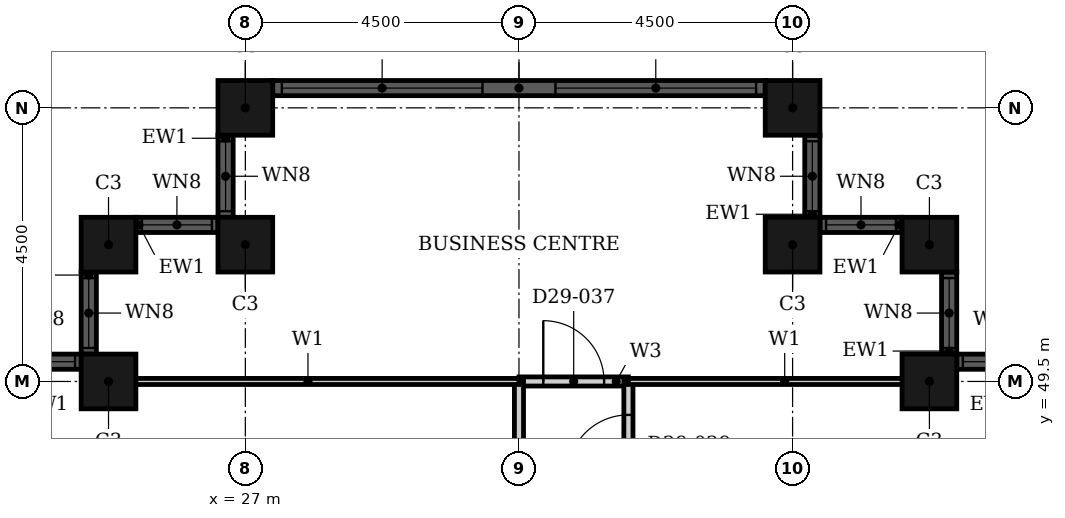
"""IFC4 building model, lengths in metres.
Left out: names, types, materials, properties, quantities, classifications, styles, units other than length and angle.
Written with IfcOpenShell. Run it as: python <this file> out.ifc"""

import sys

from ifc_helpers import new_model, si_unit, direction, frame, frame_2d, origin, origin_2d, place, context, subcontext, project, spatial, rectangle, hollow_rectangle, extrude, element, fill, save


model = new_model("IFC4")
c1 = context("Model", 3, precision=1e-05, world=origin(), true_north=direction((0.0, 1.0)))
c2 = subcontext(c1, "Body", "Model", "MODEL_VIEW")
j1 = project(units=[si_unit("LENGTHUNIT", "METRE"), si_unit("PLANEANGLEUNIT", "RADIAN")], contexts=[c1])
p1 = place(None, origin())
s1 = spatial("IfcSite", under=j1, at=p1, CompositionType="ELEMENT")
p2 = place(p1, origin())
s2 = spatial("IfcBuilding", under=s1, at=p2, CompositionType="ELEMENT")
p3 = place(p2, frame((0.0, 0.0, 118.8)))
s3 = spatial("IfcBuildingStorey", under=s2, at=p3, CompositionType="ELEMENT", Elevation=118.8)
for number, where, z_axis, x_axis in (
    (1, (38.25, 49.5, 0.0), (0.0, 0.0, 1.0), (1.0, 0.0, 0.0)),
    (2, (38.25, 51.75, 0.0), (0.0, 0.0, 1.0), (1.0, 0.0, 0.0)),
    (3, (36.0, 51.75, 0.0), (0.0, 0.0, 1.0), (1.0, 0.0, 0.0)),
    (4, (36.0, 54.0, 0.0), (0.0, 0.0, 1.0), (1.0, 0.0, 0.0)),
    (5, (27.0, 54.0, 0.0), (0.0, 0.0, 1.0), (1.0, 0.0, 0.0)),
    (6, (27.0, 51.75, 0.0), (0.0, 0.0, 1.0), (1.0, 0.0, 0.0)),
    (7, (24.75, 51.75, 0.0), (0.0, 0.0, 1.0), (1.0, 0.0, 0.0)),
    (8, (24.75, 49.5, 0.0), (0.0, 0.0, 1.0), (1.0, 0.0, 0.0)),
):
    element("IfcColumn", number, at=place(p3, frame(where, z_axis=z_axis, x_axis=x_axis)), inside=s3, PredefinedType="COLUMN", context=c2, shape_type="SweptSolid", body=[
        extrude(hollow_rectangle(XDim=0.9, YDim=0.9, WallThickness=0.028, at=origin_2d()), origin(), (0.0, 0.0, 1.0), 3.6),
    ])
p4 = place(p3, frame((40.05, 49.825, 0.0), z_axis=(0.0, 0.0, 1.0), x_axis=(-1.0, 0.0, 0.0)))
e9 = element("IfcWall", 9, at=p4, inside=s3, PredefinedType="SOLIDWALL", context=c2, shape_type="SweptSolid", body=[
    extrude(rectangle(XDim=1.35, YDim=0.25, at=frame_2d((0.675, 0.0))), origin(), (0.0, 0.0, 1.0), 3.6),
])
p5 = place(p4, frame((0.1, 0.0, 0.9)))
e10 = element("IfcOpeningElement", 10, at=p5, cuts=e9, PredefinedType="OPENING", context=c2, shape_type="SweptSolid", body=[
    extrude(rectangle(XDim=1.15, YDim=2.08, at=frame_2d((0.575, 1.04))), frame((0.0, 0.135, 0.0), z_axis=(0.0, -1.0, 0.0), x_axis=(1.0, 0.0, 0.0)), (0.0, 0.0, 1.0), 0.27),
])
p6 = place(p3, frame((38.575, 49.95, 0.0), z_axis=(0.0, 0.0, 1.0), x_axis=(0.0, 1.0, 0.0)))
e11 = element("IfcWall", 11, at=p6, inside=s3, PredefinedType="SOLIDWALL", context=c2, shape_type="SweptSolid", body=[
    extrude(rectangle(XDim=1.35, YDim=0.25, at=frame_2d((0.675, 0.0))), origin(), (0.0, 0.0, 1.0), 3.6),
])
p7 = place(p6, frame((0.1, 0.0, 0.9)))
e12 = element("IfcOpeningElement", 12, at=p7, cuts=e11, PredefinedType="OPENING", context=c2, shape_type="SweptSolid", body=[
    extrude(rectangle(XDim=1.15, YDim=2.08, at=frame_2d((0.575, 1.04))), frame((0.0, 0.135, 0.0), z_axis=(0.0, -1.0, 0.0), x_axis=(1.0, 0.0, 0.0)), (0.0, 0.0, 1.0), 0.27),
])
p8 = place(p3, frame((37.8, 52.075, 0.0), z_axis=(0.0, 0.0, 1.0), x_axis=(-1.0, 0.0, 0.0)))
e13 = element("IfcWall", 13, at=p8, inside=s3, PredefinedType="SOLIDWALL", context=c2, shape_type="SweptSolid", body=[
    extrude(rectangle(XDim=1.35, YDim=0.25, at=frame_2d((0.675, 0.0))), origin(), (0.0, 0.0, 1.0), 3.6),
])
p9 = place(p8, frame((0.1, 0.0, 0.9)))
e14 = element("IfcOpeningElement", 14, at=p9, cuts=e13, PredefinedType="OPENING", context=c2, shape_type="SweptSolid", body=[
    extrude(rectangle(XDim=1.15, YDim=2.08, at=frame_2d((0.575, 1.04))), frame((0.0, 0.135, 0.0), z_axis=(0.0, -1.0, 0.0), x_axis=(1.0, 0.0, 0.0)), (0.0, 0.0, 1.0), 0.27),
])
p10 = place(p3, frame((36.325, 52.2, 0.0), z_axis=(0.0, 0.0, 1.0), x_axis=(0.0, 1.0, 0.0)))
e15 = element("IfcWall", 15, at=p10, inside=s3, PredefinedType="SOLIDWALL", context=c2, shape_type="SweptSolid", body=[
    extrude(rectangle(XDim=1.35, YDim=0.25, at=frame_2d((0.675, 0.0))), origin(), (0.0, 0.0, 1.0), 3.6),
])
p11 = place(p10, frame((0.1, 0.0, 0.9)))
e16 = element("IfcOpeningElement", 16, at=p11, cuts=e15, PredefinedType="OPENING", context=c2, shape_type="SweptSolid", body=[
    extrude(rectangle(XDim=1.15, YDim=2.08, at=frame_2d((0.575, 1.04))), frame((0.0, 0.135, 0.0), z_axis=(0.0, -1.0, 0.0), x_axis=(1.0, 0.0, 0.0)), (0.0, 0.0, 1.0), 0.27),
])
p12 = place(p3, frame((35.55, 54.325, 0.0), z_axis=(0.0, 0.0, 1.0), x_axis=(-1.0, 0.0, 0.0)))
e17 = element("IfcWall", 17, at=p12, inside=s3, PredefinedType="SOLIDWALL", context=c2, shape_type="SweptSolid", body=[
    extrude(rectangle(XDim=8.1, YDim=0.25, at=frame_2d((4.05, 0.0))), origin(), (0.0, 0.0, 1.0), 3.6),
])
p13 = place(p12, frame((0.15, 0.0, 0.9)))
e18 = element("IfcOpeningElement", 18, at=p13, cuts=e17, PredefinedType="OPENING", context=c2, shape_type="SweptSolid", body=[
    extrude(rectangle(XDim=3.3, YDim=2.08, at=frame_2d((1.65, 1.04))), frame((0.0, 0.135, 0.0), z_axis=(0.0, -1.0, 0.0), x_axis=(1.0, 0.0, 0.0)), (0.0, 0.0, 1.0), 0.27),
])
p14 = place(p12, frame((4.65, 0.0, 0.9)))
e19 = element("IfcOpeningElement", 19, at=p14, cuts=e17, PredefinedType="OPENING", context=c2, shape_type="SweptSolid", body=[
    extrude(rectangle(XDim=3.3, YDim=2.08, at=frame_2d((1.65, 1.04))), frame((0.0, 0.135, 0.0), z_axis=(0.0, -1.0, 0.0), x_axis=(1.0, 0.0, 0.0)), (0.0, 0.0, 1.0), 0.27),
])
p15 = place(p3, frame((26.675, 53.55, 0.0), z_axis=(0.0, 0.0, 1.0), x_axis=(0.0, -1.0, 0.0)))
e20 = element("IfcWall", 20, at=p15, inside=s3, PredefinedType="SOLIDWALL", context=c2, shape_type="SweptSolid", body=[
    extrude(rectangle(XDim=1.35, YDim=0.25, at=frame_2d((0.675, 0.0))), origin(), (0.0, 0.0, 1.0), 3.6),
])
p16 = place(p15, frame((0.1, 0.0, 0.9)))
e21 = element("IfcOpeningElement", 21, at=p16, cuts=e20, PredefinedType="OPENING", context=c2, shape_type="SweptSolid", body=[
    extrude(rectangle(XDim=1.15, YDim=2.08, at=frame_2d((0.575, 1.04))), frame((0.0, 0.135, 0.0), z_axis=(0.0, -1.0, 0.0), x_axis=(1.0, 0.0, 0.0)), (0.0, 0.0, 1.0), 0.27),
])
p17 = place(p3, frame((26.55, 52.075, 0.0), z_axis=(0.0, 0.0, 1.0), x_axis=(-1.0, 0.0, 0.0)))
e22 = element("IfcWall", 22, at=p17, inside=s3, PredefinedType="SOLIDWALL", context=c2, shape_type="SweptSolid", body=[
    extrude(rectangle(XDim=1.35, YDim=0.25, at=frame_2d((0.675, 0.0))), origin(), (0.0, 0.0, 1.0), 3.6),
])
p18 = place(p17, frame((0.1, 0.0, 0.9)))
e23 = element("IfcOpeningElement", 23, at=p18, cuts=e22, PredefinedType="OPENING", context=c2, shape_type="SweptSolid", body=[
    extrude(rectangle(XDim=1.15, YDim=2.08, at=frame_2d((0.575, 1.04))), frame((0.0, 0.135, 0.0), z_axis=(0.0, -1.0, 0.0), x_axis=(1.0, 0.0, 0.0)), (0.0, 0.0, 1.0), 0.27),
])
p19 = place(p3, frame((24.425, 51.3, 0.0), z_axis=(0.0, 0.0, 1.0), x_axis=(0.0, -1.0, 0.0)))
e24 = element("IfcWall", 24, at=p19, inside=s3, PredefinedType="SOLIDWALL", context=c2, shape_type="SweptSolid", body=[
    extrude(rectangle(XDim=1.35, YDim=0.25, at=frame_2d((0.675, 0.0))), origin(), (0.0, 0.0, 1.0), 3.6),
])
p20 = place(p19, frame((0.1, 0.0, 0.9)))
e25 = element("IfcOpeningElement", 25, at=p20, cuts=e24, PredefinedType="OPENING", context=c2, shape_type="SweptSolid", body=[
    extrude(rectangle(XDim=1.15, YDim=2.08, at=frame_2d((0.575, 1.04))), frame((0.0, 0.135, 0.0), z_axis=(0.0, -1.0, 0.0), x_axis=(1.0, 0.0, 0.0)), (0.0, 0.0, 1.0), 0.27),
])
p21 = place(p3, frame((24.3, 49.825, 0.0), z_axis=(0.0, 0.0, 1.0), x_axis=(-1.0, 0.0, 0.0)))
e26 = element("IfcWall", 26, at=p21, inside=s3, PredefinedType="SOLIDWALL", context=c2, shape_type="SweptSolid", body=[
    extrude(rectangle(XDim=1.35, YDim=0.25, at=frame_2d((0.675, 0.0))), origin(), (0.0, 0.0, 1.0), 3.6),
])
p22 = place(p21, frame((0.1, 0.0, 0.9)))
e27 = element("IfcOpeningElement", 27, at=p22, cuts=e26, PredefinedType="OPENING", context=c2, shape_type="SweptSolid", body=[
    extrude(rectangle(XDim=1.15, YDim=2.08, at=frame_2d((0.575, 1.04))), frame((0.0, 0.135, 0.0), z_axis=(0.0, -1.0, 0.0), x_axis=(1.0, 0.0, 0.0)), (0.0, 0.0, 1.0), 0.27),
])
p23 = place(p3, frame((31.5, 49.5, 0.0), z_axis=(0.0, 0.0, 1.0), x_axis=(1.0, 0.0, 0.0)))
e28 = element("IfcWall", 28, at=p23, inside=s3, PredefinedType="PARTITIONING", context=c2, shape_type="SweptSolid", body=[
    extrude(rectangle(XDim=1.8, YDim=0.15, at=frame_2d((0.9, 0.0))), origin(), (0.0, 0.0, 1.0), 3.3),
])
p24 = place(p23, frame((0.4, 0.0, 0.0)))
e29 = element("IfcOpeningElement", 29, at=p24, cuts=e28, PredefinedType="OPENING", context=c2, shape_type="SweptSolid", body=[
    extrude(rectangle(XDim=1.0, YDim=2.1, at=frame_2d((0.5, 1.05))), frame((0.0, 0.085, 0.0), z_axis=(0.0, -1.0, 0.0), x_axis=(1.0, 0.0, 0.0)), (0.0, 0.0, 1.0), 0.17),
])
p25 = place(p3, frame((31.5, 33.3, 0.0), z_axis=(0.0, 0.0, 1.0), x_axis=(0.0, 1.0, 0.0)))
e30 = element("IfcWall", 30, at=p25, inside=s3, PredefinedType="PARTITIONING", context=c2, shape_type="SweptSolid", body=[
    extrude(rectangle(XDim=16.2, YDim=0.15, at=frame_2d((8.1, 0.0))), origin(), (0.0, 0.0, 1.0), 2.58),
])
p26 = place(p25, frame((8.95, 0.0, 0.0)))
e31 = element("IfcOpeningElement", 31, at=p26, cuts=e30, PredefinedType="OPENING", context=c2, shape_type="SweptSolid", body=[
    extrude(rectangle(XDim=1.0, YDim=2.1, at=frame_2d((0.5, 1.05))), frame((0.0, 0.085, 0.0), z_axis=(0.0, -1.0, 0.0), x_axis=(1.0, 0.0, 0.0)), (0.0, 0.0, 1.0), 0.17),
])
p27 = place(p3, frame((33.3, 33.3, 0.0), z_axis=(0.0, 0.0, 1.0), x_axis=(0.0, 1.0, 0.0)))
e32 = element("IfcWall", 32, at=p27, inside=s3, PredefinedType="PARTITIONING", context=c2, shape_type="SweptSolid", body=[
    extrude(rectangle(XDim=16.2, YDim=0.15, at=frame_2d((8.1, 0.0))), origin(), (0.0, 0.0, 1.0), 3.3),
])
p28 = place(p27, frame((10.15, 0.0, 0.0)))
e33 = element("IfcOpeningElement", 33, at=p28, cuts=e32, PredefinedType="OPENING", context=c2, shape_type="SweptSolid", body=[
    extrude(rectangle(XDim=1.0, YDim=2.1, at=frame_2d((0.5, 1.05))), frame((0.0, 0.085, 0.0), z_axis=(0.0, -1.0, 0.0), x_axis=(1.0, 0.0, 0.0)), (0.0, 0.0, 1.0), 0.17),
])
p29 = place(p27, frame((14.65, 0.0, 0.0)))
e34 = element("IfcOpeningElement", 34, at=p29, cuts=e32, PredefinedType="OPENING", context=c2, shape_type="SweptSolid", body=[
    extrude(rectangle(XDim=1.0, YDim=2.1, at=frame_2d((0.5, 1.05))), frame((0.0, 0.085, 0.0), z_axis=(0.0, -1.0, 0.0), x_axis=(1.0, 0.0, 0.0)), (0.0, 0.0, 1.0), 0.17),
])
p30 = place(p3, frame((33.3, 49.5, 0.0), z_axis=(0.0, 0.0, 1.0), x_axis=(1.0, 0.0, 0.0)))
e35 = element("IfcWall", 35, at=p30, inside=s3, PredefinedType="PARTITIONING", context=c2, shape_type="SweptSolid", body=[
    extrude(rectangle(XDim=5.14, YDim=0.1, at=frame_2d((2.57, 0.0))), origin(), (0.0, 0.0, 1.0), 3.3),
])
p31 = place(p3, frame((24.56, 49.5, 0.0), z_axis=(0.0, 0.0, 1.0), x_axis=(1.0, 0.0, 0.0)))
e36 = element("IfcWall", 36, at=p31, inside=s3, PredefinedType="PARTITIONING", context=c2, shape_type="SweptSolid", body=[
    extrude(rectangle(XDim=6.94, YDim=0.1, at=frame_2d((3.47, 0.0))), origin(), (0.0, 0.0, 1.0), 3.3),
])
p32 = place(p5, origin())
e37 = element("IfcWindow", 37, at=p32, inside=s3, PartitioningType="SINGLE_PANEL", PredefinedType="WINDOW", context=c2, shape_type="SweptSolid", body=[
    extrude(rectangle(XDim=1.15, YDim=2.08, at=frame_2d((0.575, 1.04))), frame((0.0, 0.03, 0.0), z_axis=(0.0, -1.0, 0.0), x_axis=(1.0, 0.0, 0.0)), (0.0, 0.0, 1.0), 0.06),
])
fill(e10, e37)
p33 = place(p7, origin())
e38 = element("IfcWindow", 38, at=p33, inside=s3, PartitioningType="SINGLE_PANEL", PredefinedType="WINDOW", context=c2, shape_type="SweptSolid", body=[
    extrude(rectangle(XDim=1.15, YDim=2.08, at=frame_2d((0.575, 1.04))), frame((0.0, 0.03, 0.0), z_axis=(0.0, -1.0, 0.0), x_axis=(1.0, 0.0, 0.0)), (0.0, 0.0, 1.0), 0.06),
])
fill(e12, e38)
p34 = place(p9, origin())
e39 = element("IfcWindow", 39, at=p34, inside=s3, PartitioningType="SINGLE_PANEL", PredefinedType="WINDOW", context=c2, shape_type="SweptSolid", body=[
    extrude(rectangle(XDim=1.15, YDim=2.08, at=frame_2d((0.575, 1.04))), frame((0.0, 0.03, 0.0), z_axis=(0.0, -1.0, 0.0), x_axis=(1.0, 0.0, 0.0)), (0.0, 0.0, 1.0), 0.06),
])
fill(e14, e39)
p35 = place(p11, origin())
e40 = element("IfcWindow", 40, at=p35, inside=s3, PartitioningType="SINGLE_PANEL", PredefinedType="WINDOW", context=c2, shape_type="SweptSolid", body=[
    extrude(rectangle(XDim=1.15, YDim=2.08, at=frame_2d((0.575, 1.04))), frame((0.0, 0.03, 0.0), z_axis=(0.0, -1.0, 0.0), x_axis=(1.0, 0.0, 0.0)), (0.0, 0.0, 1.0), 0.06),
])
fill(e16, e40)
p36 = place(p13, origin())
e41 = element("IfcWindow", 41, at=p36, inside=s3, PartitioningType="SINGLE_PANEL", PredefinedType="WINDOW", context=c2, shape_type="SweptSolid", body=[
    extrude(rectangle(XDim=3.3, YDim=2.08, at=frame_2d((1.65, 1.04))), frame((0.0, 0.03, 0.0), z_axis=(0.0, -1.0, 0.0), x_axis=(1.0, 0.0, 0.0)), (0.0, 0.0, 1.0), 0.06),
])
fill(e18, e41)
p37 = place(p14, origin())
e42 = element("IfcWindow", 42, at=p37, inside=s3, PartitioningType="SINGLE_PANEL", PredefinedType="WINDOW", context=c2, shape_type="SweptSolid", body=[
    extrude(rectangle(XDim=3.3, YDim=2.08, at=frame_2d((1.65, 1.04))), frame((0.0, 0.03, 0.0), z_axis=(0.0, -1.0, 0.0), x_axis=(1.0, 0.0, 0.0)), (0.0, 0.0, 1.0), 0.06),
])
fill(e19, e42)
p38 = place(p16, origin())
e43 = element("IfcWindow", 43, at=p38, inside=s3, PartitioningType="SINGLE_PANEL", PredefinedType="WINDOW", context=c2, shape_type="SweptSolid", body=[
    extrude(rectangle(XDim=1.15, YDim=2.08, at=frame_2d((0.575, 1.04))), frame((0.0, 0.03, 0.0), z_axis=(0.0, -1.0, 0.0), x_axis=(1.0, 0.0, 0.0)), (0.0, 0.0, 1.0), 0.06),
])
fill(e21, e43)
p39 = place(p18, origin())
e44 = element("IfcWindow", 44, at=p39, inside=s3, PartitioningType="SINGLE_PANEL", PredefinedType="WINDOW", context=c2, shape_type="SweptSolid", body=[
    extrude(rectangle(XDim=1.15, YDim=2.08, at=frame_2d((0.575, 1.04))), frame((0.0, 0.03, 0.0), z_axis=(0.0, -1.0, 0.0), x_axis=(1.0, 0.0, 0.0)), (0.0, 0.0, 1.0), 0.06),
])
fill(e23, e44)
p40 = place(p20, origin())
e45 = element("IfcWindow", 45, at=p40, inside=s3, PartitioningType="SINGLE_PANEL", PredefinedType="WINDOW", context=c2, shape_type="SweptSolid", body=[
    extrude(rectangle(XDim=1.15, YDim=2.08, at=frame_2d((0.575, 1.04))), frame((0.0, 0.03, 0.0), z_axis=(0.0, -1.0, 0.0), x_axis=(1.0, 0.0, 0.0)), (0.0, 0.0, 1.0), 0.06),
])
fill(e25, e45)
p41 = place(p22, origin())
e46 = element("IfcWindow", 46, at=p41, inside=s3, PartitioningType="SINGLE_PANEL", PredefinedType="WINDOW", context=c2, shape_type="SweptSolid", body=[
    extrude(rectangle(XDim=1.15, YDim=2.08, at=frame_2d((0.575, 1.04))), frame((0.0, 0.03, 0.0), z_axis=(0.0, -1.0, 0.0), x_axis=(1.0, 0.0, 0.0)), (0.0, 0.0, 1.0), 0.06),
])
fill(e27, e46)
p42 = place(p29, origin())
e47 = element("IfcDoor", 47, at=p42, inside=s3, OperationType="SINGLE_SWING_RIGHT", PredefinedType="DOOR", context=c2, shape_type="SweptSolid", body=[
    extrude(rectangle(XDim=1.0, YDim=2.1, at=frame_2d((0.5, 1.05))), frame((0.0, 0.025, 0.0), z_axis=(0.0, -1.0, 0.0), x_axis=(1.0, 0.0, 0.0)), (0.0, 0.0, 1.0), 0.05),
])
fill(e34, e47)
p43 = place(p24, origin())
e48 = element("IfcDoor", 48, at=p43, inside=s3, OperationType="SINGLE_SWING_LEFT", PredefinedType="DOOR", context=c2, shape_type="SweptSolid", body=[
    extrude(rectangle(XDim=1.0, YDim=2.1, at=frame_2d((0.5, 1.05))), frame((0.0, 0.025, 0.0), z_axis=(0.0, -1.0, 0.0), x_axis=(1.0, 0.0, 0.0)), (0.0, 0.0, 1.0), 0.05),
])
fill(e29, e48)
save(model, sys.argv[1])
